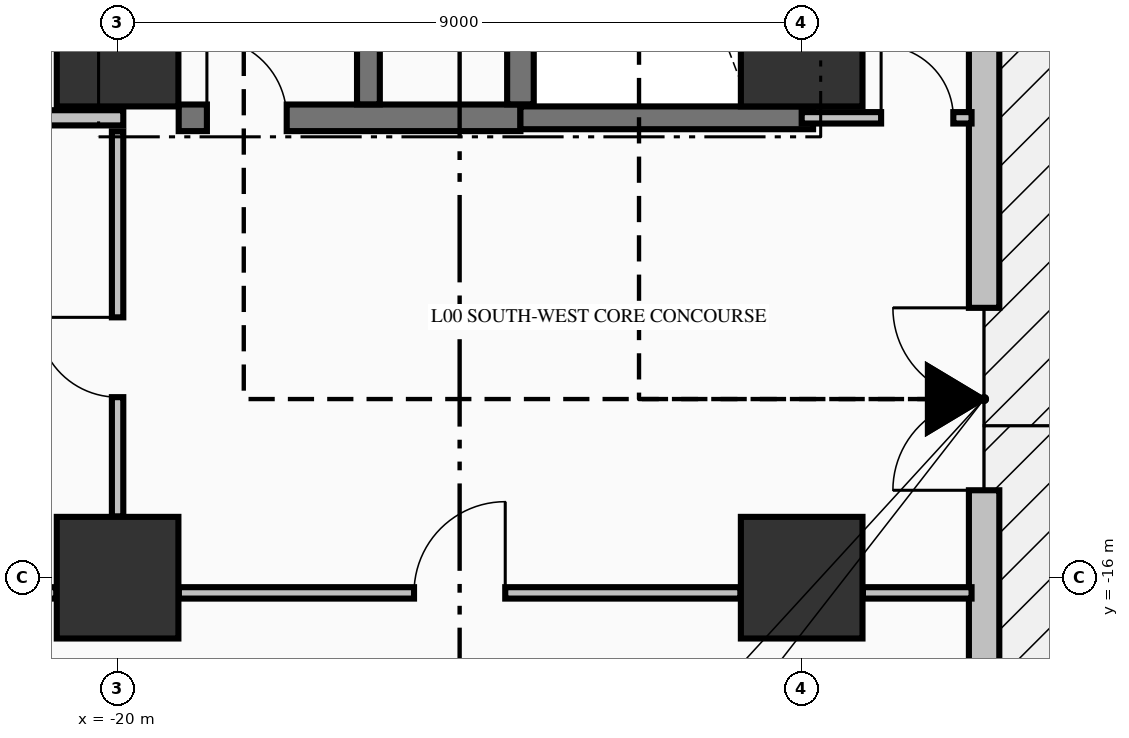
"""IFC4 building model, lengths in metres.
Left out: names, types, materials, properties, quantities, classifications, styles, units other than length and angle.
Written with IfcOpenShell. Run it as: python <this file> out.ifc"""

import sys

from ifc_helpers import new_model, si_unit, direction, frame, frame_2d, origin, origin_2d, place, context, subcontext, project, spatial, rectangle, extrude, element, fill, save


model = new_model("IFC4")
c1 = context("Model", 3, precision=1e-05, world=origin(), true_north=direction((0.0, 1.0)))
c2 = subcontext(c1, "Body", "Model", "MODEL_VIEW")
j1 = project(units=[si_unit("LENGTHUNIT", "METRE"), si_unit("PLANEANGLEUNIT", "RADIAN")], contexts=[c1])
p1 = place(None, origin())
s1 = spatial("IfcSite", under=j1, at=p1, CompositionType="ELEMENT")
p2 = place(p1, origin())
s2 = spatial("IfcBuilding", under=s1, at=p2, CompositionType="ELEMENT")
p3 = place(p2, origin())
s3 = spatial("IfcBuildingStorey", under=s2, at=p3, CompositionType="ELEMENT", Elevation=0.0)
for number, where, z_axis, x_axis in (
    (1, (-20.0, -16.0, 0.0), (0.0, 0.0, 1.0), (1.0, 0.0, 0.0)),
    (2, (-20.0, -9.0, 0.0), (0.0, 0.0, 1.0), (1.0, 0.0, 0.0)),
    (3, (-11.0, -16.0, 0.0), (0.0, 0.0, 1.0), (1.0, 0.0, 0.0)),
    (4, (-11.0, -9.0, 0.0), (0.0, 0.0, 1.0), (1.0, 0.0, 0.0)),
):
    element("IfcColumn", number, at=place(p3, frame(where, z_axis=z_axis, x_axis=x_axis)), inside=s3, PredefinedType="COLUMN", context=c2, shape_type="SweptSolid", body=[
        extrude(rectangle(XDim=1.6, YDim=1.6, at=origin_2d()), origin(), (0.0, 0.0, 1.0), 5.09),
    ])
p4 = place(p3, frame((-8.6, -25.35, 0.0), z_axis=(0.0, 0.0, 1.0), x_axis=(0.0, 1.0, 0.0)))
e5 = element("IfcWall", 5, at=p4, inside=s3, PredefinedType="STANDARD", context=c2, shape_type="SweptSolid", body=[
    extrude(rectangle(XDim=24.7, YDim=0.4, at=frame_2d((12.35, 0.0))), origin(), (0.0, 0.0, 1.0), 4.132),
])
p5 = place(p4, frame((10.5, 0.0, 0.0)))
e6 = element("IfcOpeningElement", 6, at=p5, cuts=e5, PredefinedType="OPENING", context=c2, shape_type="SweptSolid", body=[
    extrude(rectangle(XDim=2.4, YDim=2.6, at=frame_2d((1.2, 1.3))), frame((0.0, 0.21, 0.0), z_axis=(0.0, -1.0, 0.0), x_axis=(1.0, 0.0, 0.0)), (0.0, 0.0, 1.0), 0.42),
])
p6 = place(p3, frame((-19.196, -9.95, 0.0), z_axis=(0.0, 0.0, 1.0), x_axis=(1.0, 0.0, 0.0)))
e7 = element("IfcWall", 7, at=p6, inside=s3, PredefinedType="SHEAR", context=c2, shape_type="SweptSolid", body=[
    extrude(rectangle(XDim=4.496, YDim=0.35, at=frame_2d((2.248, 0.0))), origin(), (0.0, 0.0, 1.0), 5.09),
])
p7 = place(p6, frame((0.371, 0.0, 0.0)))
e8 = element("IfcOpeningElement", 8, at=p7, cuts=e7, PredefinedType="OPENING", context=c2, shape_type="SweptSolid", body=[
    extrude(rectangle(XDim=1.05, YDim=2.15, at=frame_2d((0.525, 1.075))), frame((0.0, 0.185, 0.0), z_axis=(0.0, -1.0, 0.0), x_axis=(1.0, 0.0, 0.0)), (0.0, 0.0, 1.0), 0.37),
])
p8 = place(p3, frame((-14.7, -9.95, 0.0), z_axis=(0.0, 0.0, 1.0), x_axis=(1.0, 0.0, 0.0)))
e9 = element("IfcWall", 9, at=p8, inside=s3, PredefinedType="SHEAR", context=c2, shape_type="SweptSolid", body=[
    extrude(rectangle(XDim=3.85, YDim=0.3, at=frame_2d((1.925, 0.0))), origin(), (0.0, 0.0, 1.0), 5.09),
])
p9 = place(p3, frame((-22.5, -16.2, 0.0), z_axis=(0.0, 0.0, 1.0), x_axis=(1.0, 0.0, 0.0)))
e10 = element("IfcWall", 10, at=p9, inside=s3, PredefinedType="PARTITIONING", context=c2, shape_type="SweptSolid", body=[
    extrude(rectangle(XDim=1.694, YDim=0.15, at=frame_2d((0.847, 0.0))), origin(), (0.0, 0.0, 1.0), 4.132),
])
p10 = place(p3, frame((-19.194, -16.2, 0.0), z_axis=(0.0, 0.0, 1.0), x_axis=(1.0, 0.0, 0.0)))
e11 = element("IfcWall", 11, at=p10, inside=s3, PredefinedType="PARTITIONING", context=c2, shape_type="SweptSolid", body=[
    extrude(rectangle(XDim=7.388, YDim=0.15, at=frame_2d((3.694, 0.0))), origin(), (0.0, 0.0, 1.0), 4.132),
])
p11 = place(p10, frame((3.094, 0.0, 0.0)))
e12 = element("IfcOpeningElement", 12, at=p11, cuts=e11, PredefinedType="OPENING", context=c2, shape_type="SweptSolid", body=[
    extrude(rectangle(XDim=1.2, YDim=2.15, at=frame_2d((0.6, 1.075))), frame((0.0, 0.085, 0.0), z_axis=(0.0, -1.0, 0.0), x_axis=(1.0, 0.0, 0.0)), (0.0, 0.0, 1.0), 0.17),
])
p12 = place(p3, frame((-10.194, -16.2, 0.0), z_axis=(0.0, 0.0, 1.0), x_axis=(1.0, 0.0, 0.0)))
e13 = element("IfcWall", 13, at=p12, inside=s3, PredefinedType="PARTITIONING", context=c2, shape_type="SweptSolid", body=[
    extrude(rectangle(XDim=1.429, YDim=0.15, at=frame_2d((0.715, 0.0))), origin(), (0.0, 0.0, 1.0), 5.09),
])
p13 = place(p3, frame((-22.5, -9.95, 0.0), z_axis=(0.0, 0.0, 1.0), x_axis=(1.0, 0.0, 0.0)))
e14 = element("IfcWall", 14, at=p13, inside=s3, PredefinedType="PARTITIONING", context=c2, shape_type="SweptSolid", body=[
    extrude(rectangle(XDim=2.575, YDim=0.2, at=frame_2d((1.288, 0.0))), origin(), (0.0, 0.0, 1.0), 5.09),
])
p14 = place(p13, frame((0.48, 0.0, 0.0)))
e15 = element("IfcOpeningElement", 15, at=p14, cuts=e14, PredefinedType="OPENING", context=c2, shape_type="SweptSolid", body=[
    extrude(rectangle(XDim=1.0, YDim=2.15, at=frame_2d((0.5, 1.075))), frame((0.0, 0.11, 0.0), z_axis=(0.0, -1.0, 0.0), x_axis=(1.0, 0.0, 0.0)), (0.0, 0.0, 1.0), 0.22),
])
p15 = place(p3, frame((-11.0, -9.95, 0.0), z_axis=(0.0, 0.0, 1.0), x_axis=(1.0, 0.0, 0.0)))
e16 = element("IfcWall", 16, at=p15, inside=s3, PredefinedType="PARTITIONING", context=c2, shape_type="SweptSolid", body=[
    extrude(rectangle(XDim=2.235, YDim=0.15, at=frame_2d((1.118, 0.0))), origin(), (0.0, 0.0, 1.0), 5.09),
])
p16 = place(p15, frame((1.045, 0.0, 0.0)))
e17 = element("IfcOpeningElement", 17, at=p16, cuts=e16, PredefinedType="OPENING", context=c2, shape_type="SweptSolid", body=[
    extrude(rectangle(XDim=0.95, YDim=2.15, at=frame_2d((0.475, 1.075))), frame((0.0, 0.085, 0.0), z_axis=(0.0, -1.0, 0.0), x_axis=(1.0, 0.0, 0.0)), (0.0, 0.0, 1.0), 0.17),
])
p17 = place(p3, frame((-16.7, -9.773, 0.0), z_axis=(0.0, 0.0, 1.0), x_axis=(0.0, 1.0, 0.0)))
e18 = element("IfcWall", 18, at=p17, inside=s3, PredefinedType="SHEAR", context=c2, shape_type="SweptSolid", body=[
    extrude(rectangle(XDim=9.371, YDim=0.3, at=frame_2d((4.686, 0.0))), origin(), (0.0, 0.0, 1.0), 5.09),
])
p18 = place(p3, frame((-14.7, -9.773, 0.0), z_axis=(0.0, 0.0, 1.0), x_axis=(0.0, 1.0, 0.0)))
e19 = element("IfcWall", 19, at=p18, inside=s3, PredefinedType="SHEAR", context=c2, shape_type="SweptSolid", body=[
    extrude(rectangle(XDim=9.371, YDim=0.35, at=frame_2d((4.686, 0.0))), origin(), (0.0, 0.0, 1.0), 5.09),
])
p19 = place(p3, frame((-20.0, -15.194, 0.0), z_axis=(0.0, 0.0, 1.0), x_axis=(0.0, 1.0, 0.0)))
e20 = element("IfcWall", 20, at=p19, inside=s3, PredefinedType="PARTITIONING", context=c2, shape_type="SweptSolid", body=[
    extrude(rectangle(XDim=5.066, YDim=0.15, at=frame_2d((2.533, 0.0))), origin(), (0.0, 0.0, 1.0), 5.09),
])
p20 = place(p19, frame((1.569, 0.0, 0.0)))
e21 = element("IfcOpeningElement", 21, at=p20, cuts=e20, PredefinedType="OPENING", context=c2, shape_type="SweptSolid", body=[
    extrude(rectangle(XDim=1.05, YDim=2.15, at=frame_2d((0.525, 1.075))), frame((0.0, 0.085, 0.0), z_axis=(0.0, -1.0, 0.0), x_axis=(1.0, 0.0, 0.0)), (0.0, 0.0, 1.0), 0.17),
])
p21 = place(p5, origin())
e22 = element("IfcDoor", 22, at=p21, inside=s3, OperationType="DOUBLE_DOOR_DOUBLE_SWING", PredefinedType="DOOR", context=c2, shape_type="SweptSolid", body=[
    extrude(rectangle(XDim=2.4, YDim=2.6, at=frame_2d((1.2, 1.3))), frame((0.0, 0.025, 0.0), z_axis=(0.0, -1.0, 0.0), x_axis=(1.0, 0.0, 0.0)), (0.0, 0.0, 1.0), 0.05),
])
fill(e6, e22)
p22 = place(p7, origin())
e23 = element("IfcDoor", 23, at=p22, inside=s3, OperationType="SINGLE_SWING_LEFT", PredefinedType="DOOR", context=c2, shape_type="SweptSolid", body=[
    extrude(rectangle(XDim=1.05, YDim=2.15, at=frame_2d((0.525, 1.075))), frame((0.0, 0.025, 0.0), z_axis=(0.0, -1.0, 0.0), x_axis=(1.0, 0.0, 0.0)), (0.0, 0.0, 1.0), 0.05),
])
fill(e8, e23)
p23 = place(p16, origin())
e24 = element("IfcDoor", 24, at=p23, inside=s3, OperationType="SINGLE_SWING_LEFT", PredefinedType="DOOR", context=c2, shape_type="SweptSolid", body=[
    extrude(rectangle(XDim=0.95, YDim=2.15, at=frame_2d((0.475, 1.075))), frame((0.0, 0.025, 0.0), z_axis=(0.0, -1.0, 0.0), x_axis=(1.0, 0.0, 0.0)), (0.0, 0.0, 1.0), 0.05),
])
fill(e17, e24)
p24 = place(p20, origin())
e25 = element("IfcDoor", 25, at=p24, inside=s3, OperationType="SINGLE_SWING_RIGHT", PredefinedType="DOOR", context=c2, shape_type="SweptSolid", body=[
    extrude(rectangle(XDim=1.05, YDim=2.15, at=frame_2d((0.525, 1.075))), frame((0.0, 0.025, 0.0), z_axis=(0.0, -1.0, 0.0), x_axis=(1.0, 0.0, 0.0)), (0.0, 0.0, 1.0), 0.05),
])
fill(e21, e25)
p25 = place(p11, origin())
e26 = element("IfcDoor", 26, at=p25, inside=s3, OperationType="SINGLE_SWING_RIGHT", PredefinedType="DOOR", context=c2, shape_type="SweptSolid", body=[
    extrude(rectangle(XDim=1.2, YDim=2.15, at=frame_2d((0.6, 1.075))), frame((0.0, 0.025, 0.0), z_axis=(0.0, -1.0, 0.0), x_axis=(1.0, 0.0, 0.0)), (0.0, 0.0, 1.0), 0.05),
])
fill(e12, e26)
save(model, sys.argv[1])
